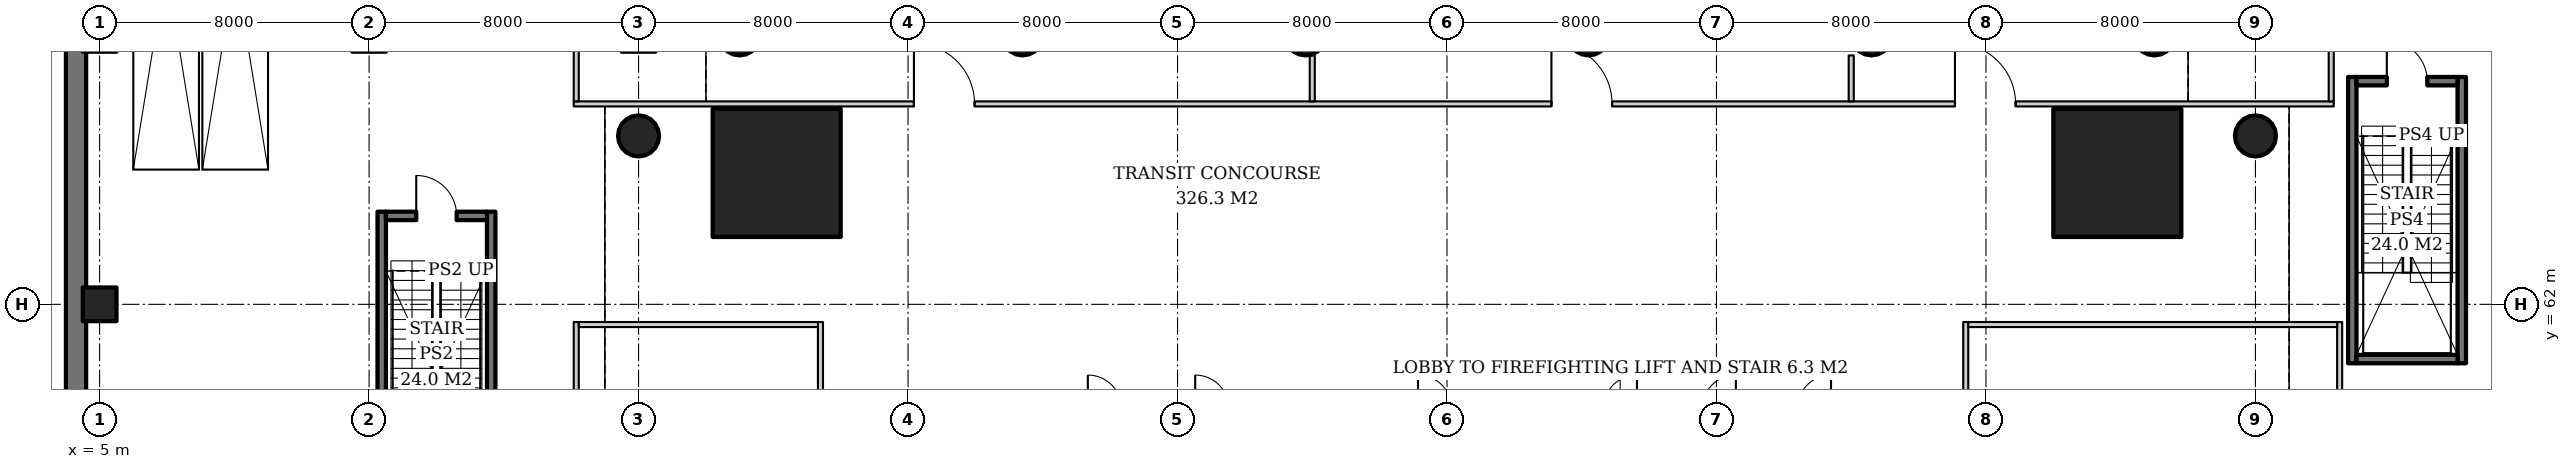
"""IFC4 building model, lengths in metres.
Left out: names, types, materials, properties, quantities, classifications, styles, units other than length and angle.
Written with IfcOpenShell. Run it as: python <this file> out.ifc"""

import sys

from ifc_helpers import new_model, si_unit, direction, frame, frame_2d, origin, origin_2d, place, context, subcontext, project, spatial, rectangle, hollow_circle, extrude, element, fill, save


model = new_model("IFC4")
c1 = context("Model", 3, precision=1e-05, world=origin(), true_north=direction((0.0, 1.0)))
c2 = subcontext(c1, "Body", "Model", "MODEL_VIEW")
j1 = project(units=[si_unit("LENGTHUNIT", "METRE"), si_unit("PLANEANGLEUNIT", "RADIAN")], contexts=[c1])
p1 = place(None, origin())
s1 = spatial("IfcSite", under=j1, at=p1, CompositionType="ELEMENT")
p2 = place(p1, origin())
s2 = spatial("IfcBuilding", under=s1, at=p2, CompositionType="ELEMENT")
p3 = place(p2, frame((0.0, 0.0, -5.0)))
s3 = spatial("IfcBuildingStorey", under=s2, at=p3, CompositionType="ELEMENT", Elevation=-5.0)
p4 = place(p3, frame((5.0, 62.0, 0.0), z_axis=(0.0, 0.0, 1.0), x_axis=(1.0, 0.0, 0.0)))
e1 = element("IfcColumn", 1, at=p4, inside=s3, PredefinedType="COLUMN", context=c2, shape_type="SweptSolid", body=[
    extrude(rectangle(XDim=1.0, YDim=1.0, at=origin_2d()), origin(), (0.0, 0.0, 1.0), 5.0),
])
p5 = place(p3, frame((4.3, 5.6, 0.0), z_axis=(0.0, 0.0, 1.0), x_axis=(0.0, 1.0, 0.0)))
e2 = element("IfcWall", 2, at=p5, inside=s3, PredefinedType="USERDEFINED", context=c2, shape_type="SweptSolid", body=[
    extrude(rectangle(XDim=88.8, YDim=0.6, at=frame_2d((44.4, 0.0))), origin(), (0.0, 0.0, 1.0), 5.0),
])
p6 = place(p3, frame((64.9, 65.9, 0.0), z_axis=(0.0, 0.0, 1.0), x_axis=(1.0, 0.0, 0.0)))
e3 = element("IfcColumn", 3, at=p6, inside=s3, PredefinedType="COLUMN", context=c2, shape_type="SweptSolid", body=[
    extrude(rectangle(XDim=3.8, YDim=3.8, at=origin_2d()), origin(), (0.0, 0.0, 1.0), 5.0),
])
p7 = place(p3, frame((69.0, 67.0, 0.0), z_axis=(0.0, 0.0, 1.0), x_axis=(1.0, 0.0, 0.0)))
e4 = element("IfcColumn", 4, at=p7, inside=s3, PredefinedType="COLUMN", context=c2, shape_type="SweptSolid", body=[
    extrude(hollow_circle(Radius=0.61, WallThickness=0.04, at=origin_2d()), origin(), (0.0, 0.0, 1.0), 5.0),
])
p8 = place(p3, frame((25.1, 65.9, 0.0), z_axis=(0.0, 0.0, 1.0), x_axis=(1.0, 0.0, 0.0)))
e5 = element("IfcColumn", 5, at=p8, inside=s3, PredefinedType="COLUMN", context=c2, shape_type="SweptSolid", body=[
    extrude(rectangle(XDim=3.8, YDim=3.8, at=origin_2d()), origin(), (0.0, 0.0, 1.0), 5.0),
])
for number, where, z_axis, x_axis in (
    (6, (66.0, 70.0, 0.0), (0.0, 0.0, 1.0), (1.0, 0.0, 0.0)),
    (7, (24.0, 70.0, 0.0), (0.0, 0.0, 1.0), (1.0, 0.0, 0.0)),
    (8, (57.6, 70.0, 0.0), (0.0, 0.0, 1.0), (1.0, 0.0, 0.0)),
    (9, (49.2, 70.0, 0.0), (0.0, 0.0, 1.0), (1.0, 0.0, 0.0)),
    (10, (40.8, 70.0, 0.0), (0.0, 0.0, 1.0), (1.0, 0.0, 0.0)),
    (11, (32.4, 70.0, 0.0), (0.0, 0.0, 1.0), (1.0, 0.0, 0.0)),
    (12, (21.0, 67.0, 0.0), (0.0, 0.0, 1.0), (1.0, 0.0, 0.0)),
):
    element("IfcColumn", number, at=place(p3, frame(where, z_axis=z_axis, x_axis=x_axis)), inside=s3, PredefinedType="COLUMN", context=c2, shape_type="SweptSolid", body=[
        extrude(hollow_circle(Radius=0.61, WallThickness=0.04, at=origin_2d()), origin(), (0.0, 0.0, 1.0), 5.0),
    ])
for number, where, z_axis, x_axis in (
    (13, (13.375, 56.25, 0.0), (0.0, 0.0, 1.0), (0.0, 1.0, 0.0)),
    (14, (16.625, 56.25, 0.0), (0.0, 0.0, 1.0), (0.0, 1.0, 0.0)),
):
    element("IfcWall", number, at=place(p3, frame(where, z_axis=z_axis, x_axis=x_axis)), inside=s3, PredefinedType="SOLIDWALL", context=c2, shape_type="SweptSolid", body=[
        extrude(rectangle(XDim=8.5, YDim=0.25, at=frame_2d((4.25, 0.0))), origin(), (0.0, 0.0, 1.0), 4.6),
    ])
p9 = place(p3, frame((13.5, 64.625, 0.0), z_axis=(0.0, 0.0, 1.0), x_axis=(1.0, 0.0, 0.0)))
e15 = element("IfcWall", 15, at=p9, inside=s3, PredefinedType="SOLIDWALL", context=c2, shape_type="SweptSolid", body=[
    extrude(rectangle(XDim=3.0, YDim=0.25, at=frame_2d((1.5, 0.0))), origin(), (0.0, 0.0, 1.0), 4.6),
])
p10 = place(p9, frame((0.9, 0.0, 0.0)))
e16 = element("IfcOpeningElement", 16, at=p10, cuts=e15, PredefinedType="OPENING", context=c2, shape_type="SweptSolid", body=[
    extrude(rectangle(XDim=1.2, YDim=2.1, at=frame_2d((0.6, 1.05))), frame((0.0, 0.135, 0.0), z_axis=(0.0, -1.0, 0.0), x_axis=(1.0, 0.0, 0.0)), (0.0, 0.0, 1.0), 0.27),
])
for number, where, z_axis, x_axis in (
    (17, (71.875, 60.25, 0.0), (0.0, 0.0, 1.0), (0.0, 1.0, 0.0)),
    (18, (75.125, 60.25, 0.0), (0.0, 0.0, 1.0), (0.0, 1.0, 0.0)),
):
    element("IfcWall", number, at=place(p3, frame(where, z_axis=z_axis, x_axis=x_axis)), inside=s3, PredefinedType="SOLIDWALL", context=c2, shape_type="SweptSolid", body=[
        extrude(rectangle(XDim=8.5, YDim=0.25, at=frame_2d((4.25, 0.0))), origin(), (0.0, 0.0, 1.0), 4.6),
    ])
p11 = place(p3, frame((72.0, 60.375, 0.0), z_axis=(0.0, 0.0, 1.0), x_axis=(1.0, 0.0, 0.0)))
e19 = element("IfcWall", 19, at=p11, inside=s3, PredefinedType="SOLIDWALL", context=c2, shape_type="SweptSolid", body=[
    extrude(rectangle(XDim=3.0, YDim=0.25, at=frame_2d((1.5, 0.0))), origin(), (0.0, 0.0, 1.0), 4.6),
])
p12 = place(p3, frame((72.0, 68.625, 0.0), z_axis=(0.0, 0.0, 1.0), x_axis=(1.0, 0.0, 0.0)))
e20 = element("IfcWall", 20, at=p12, inside=s3, PredefinedType="SOLIDWALL", context=c2, shape_type="SweptSolid", body=[
    extrude(rectangle(XDim=3.0, YDim=0.25, at=frame_2d((1.5, 0.0))), origin(), (0.0, 0.0, 1.0), 4.6),
])
p13 = place(p12, frame((0.9, 0.0, 0.0)))
e21 = element("IfcOpeningElement", 21, at=p13, cuts=e20, PredefinedType="OPENING", context=c2, shape_type="SweptSolid", body=[
    extrude(rectangle(XDim=1.2, YDim=2.1, at=frame_2d((0.6, 1.05))), frame((0.0, 0.135, 0.0), z_axis=(0.0, -1.0, 0.0), x_axis=(1.0, 0.0, 0.0)), (0.0, 0.0, 1.0), 0.27),
])
p14 = place(p3, frame((19.15, 30.6, 0.0), z_axis=(0.0, 0.0, 1.0), x_axis=(0.0, 1.0, 0.0)))
e22 = element("IfcWall", 22, at=p14, inside=s3, PredefinedType="PARTITIONING", context=c2, shape_type="SweptSolid", body=[
    extrude(rectangle(XDim=30.875, YDim=0.15, at=frame_2d((15.438, 0.0))), origin(), (0.0, 0.0, 1.0), 4.6),
])
p15 = place(p3, frame((26.4, 30.6, 0.0), z_axis=(0.0, 0.0, 1.0), x_axis=(0.0, 1.0, 0.0)))
e23 = element("IfcWall", 23, at=p15, inside=s3, PredefinedType="PARTITIONING", context=c2, shape_type="SweptSolid", body=[
    extrude(rectangle(XDim=30.875, YDim=0.15, at=frame_2d((15.438, 0.0))), origin(), (0.0, 0.0, 1.0), 3.688),
])
p16 = place(p15, frame((6.8, 0.0, 0.0)))
e24 = element("IfcOpeningElement", 24, at=p16, cuts=e23, PredefinedType="OPENING", context=c2, shape_type="SweptSolid", body=[
    extrude(rectangle(XDim=1.8, YDim=2.4, at=frame_2d((0.9, 1.2))), frame((0.0, 0.085, 0.0), z_axis=(0.0, -1.0, 0.0), x_axis=(1.0, 0.0, 0.0)), (0.0, 0.0, 1.0), 0.17),
])
p17 = place(p15, frame((22.2, 0.0, 0.0)))
e25 = element("IfcOpeningElement", 25, at=p17, cuts=e23, PredefinedType="OPENING", context=c2, shape_type="SweptSolid", body=[
    extrude(rectangle(XDim=1.8, YDim=2.4, at=frame_2d((0.9, 1.2))), frame((0.0, 0.085, 0.0), z_axis=(0.0, -1.0, 0.0), x_axis=(1.0, 0.0, 0.0)), (0.0, 0.0, 1.0), 0.17),
])
p18 = place(p3, frame((19.225, 61.4, 0.0), z_axis=(0.0, 0.0, 1.0), x_axis=(1.0, 0.0, 0.0)))
e26 = element("IfcWall", 26, at=p18, inside=s3, PredefinedType="PARTITIONING", context=c2, shape_type="SweptSolid", body=[
    extrude(rectangle(XDim=7.1, YDim=0.15, at=frame_2d((3.55, 0.0))), origin(), (0.0, 0.0, 1.0), 4.1),
])
p19 = place(p3, frame((60.4, 30.6, 0.0), z_axis=(0.0, 0.0, 1.0), x_axis=(0.0, 1.0, 0.0)))
e27 = element("IfcWall", 27, at=p19, inside=s3, PredefinedType="PARTITIONING", context=c2, shape_type="SweptSolid", body=[
    extrude(rectangle(XDim=30.875, YDim=0.15, at=frame_2d((15.438, 0.0))), origin(), (0.0, 0.0, 1.0), 3.688),
])
p20 = place(p19, frame((6.8, 0.0, 0.0)))
e28 = element("IfcOpeningElement", 28, at=p20, cuts=e27, PredefinedType="OPENING", context=c2, shape_type="SweptSolid", body=[
    extrude(rectangle(XDim=1.8, YDim=2.4, at=frame_2d((0.9, 1.2))), frame((0.0, 0.085, 0.0), z_axis=(0.0, -1.0, 0.0), x_axis=(1.0, 0.0, 0.0)), (0.0, 0.0, 1.0), 0.17),
])
p21 = place(p19, frame((22.2, 0.0, 0.0)))
e29 = element("IfcOpeningElement", 29, at=p21, cuts=e27, PredefinedType="OPENING", context=c2, shape_type="SweptSolid", body=[
    extrude(rectangle(XDim=1.8, YDim=2.4, at=frame_2d((0.9, 1.2))), frame((0.0, 0.085, 0.0), z_axis=(0.0, -1.0, 0.0), x_axis=(1.0, 0.0, 0.0)), (0.0, 0.0, 1.0), 0.17),
])
p22 = place(p3, frame((71.5, 30.6, 0.0), z_axis=(0.0, 0.0, 1.0), x_axis=(0.0, 1.0, 0.0)))
e30 = element("IfcWall", 30, at=p22, inside=s3, PredefinedType="PARTITIONING", context=c2, shape_type="SweptSolid", body=[
    extrude(rectangle(XDim=30.875, YDim=0.15, at=frame_2d((15.438, 0.0))), origin(), (0.0, 0.0, 1.0), 4.6),
])
p23 = place(p3, frame((60.475, 61.4, 0.0), z_axis=(0.0, 0.0, 1.0), x_axis=(1.0, 0.0, 0.0)))
e31 = element("IfcWall", 31, at=p23, inside=s3, PredefinedType="PARTITIONING", context=c2, shape_type="SweptSolid", body=[
    extrude(rectangle(XDim=10.95, YDim=0.15, at=frame_2d((5.475, 0.0))), origin(), (0.0, 0.0, 1.0), 4.1),
])
p24 = place(p3, frame((19.075, 67.95, 0.0), z_axis=(0.0, 0.0, 1.0), x_axis=(1.0, 0.0, 0.0)))
e32 = element("IfcWall", 32, at=p24, inside=s3, PredefinedType="PARTITIONING", context=c2, shape_type="SweptSolid", body=[
    extrude(rectangle(XDim=52.25, YDim=0.15, at=frame_2d((26.125, 0.0))), origin(), (0.0, 0.0, 1.0), 3.688),
])
p25 = place(p24, frame((10.1, 0.0, 0.0)))
e33 = element("IfcOpeningElement", 33, at=p25, cuts=e32, PredefinedType="OPENING", context=c2, shape_type="SweptSolid", body=[
    extrude(rectangle(XDim=1.8, YDim=2.4, at=frame_2d((0.9, 1.2))), frame((0.0, 0.085, 0.0), z_axis=(0.0, -1.0, 0.0), x_axis=(1.0, 0.0, 0.0)), (0.0, 0.0, 1.0), 0.17),
])
p26 = place(p24, frame((29.025, 0.0, 0.0)))
e34 = element("IfcOpeningElement", 34, at=p26, cuts=e32, PredefinedType="OPENING", context=c2, shape_type="SweptSolid", body=[
    extrude(rectangle(XDim=1.8, YDim=2.4, at=frame_2d((0.9, 1.2))), frame((0.0, 0.085, 0.0), z_axis=(0.0, -1.0, 0.0), x_axis=(1.0, 0.0, 0.0)), (0.0, 0.0, 1.0), 0.17),
])
p27 = place(p24, frame((41.005, 0.0, 0.0)))
e35 = element("IfcOpeningElement", 35, at=p27, cuts=e32, PredefinedType="OPENING", context=c2, shape_type="SweptSolid", body=[
    extrude(rectangle(XDim=1.8, YDim=2.4, at=frame_2d((0.9, 1.2))), frame((0.0, 0.085, 0.0), z_axis=(0.0, -1.0, 0.0), x_axis=(1.0, 0.0, 0.0)), (0.0, 0.0, 1.0), 0.17),
])
for number, where, z_axis, x_axis in (
    (36, (19.15, 68.025, 0.0), (0.0, 0.0, 1.0), (0.0, 1.0, 0.0)),
    (37, (71.25, 68.025, 0.0), (0.0, 0.0, 1.0), (0.0, 1.0, 0.0)),
):
    element("IfcWall", number, at=place(p3, frame(where, z_axis=z_axis, x_axis=x_axis)), inside=s3, PredefinedType="PARTITIONING", context=c2, shape_type="SweptSolid", body=[
        extrude(rectangle(XDim=11.5, YDim=0.15, at=frame_2d((5.75, 0.0))), origin(), (0.0, 0.0, 1.0), 4.6),
    ])
for number, where, z_axis, x_axis in (
    (38, (41.0, 68.025, 0.0), (0.0, 0.0, 1.0), (0.0, 1.0, 0.0)),
    (39, (57.0, 68.025, 0.0), (0.0, 0.0, 1.0), (0.0, 1.0, 0.0)),
):
    element("IfcWall", number, at=place(p3, frame(where, z_axis=z_axis, x_axis=x_axis)), inside=s3, PredefinedType="PARTITIONING", context=c2, shape_type="SweptSolid", body=[
        extrude(rectangle(XDim=1.365, YDim=0.15, at=frame_2d((0.683, 0.0))), origin(), (0.0, 0.0, 1.0), 4.7),
    ])
p28 = place(p10, origin())
e40 = element("IfcDoor", 40, at=p28, inside=s3, OperationType="SINGLE_SWING_LEFT", PredefinedType="DOOR", context=c2, shape_type="SweptSolid", body=[
    extrude(rectangle(XDim=1.2, YDim=2.1, at=frame_2d((0.6, 1.05))), frame((0.0, 0.025, 0.0), z_axis=(0.0, -1.0, 0.0), x_axis=(1.0, 0.0, 0.0)), (0.0, 0.0, 1.0), 0.05),
])
fill(e16, e40)
p29 = place(p13, origin())
e41 = element("IfcDoor", 41, at=p29, inside=s3, OperationType="SINGLE_SWING_LEFT", PredefinedType="DOOR", context=c2, shape_type="SweptSolid", body=[
    extrude(rectangle(XDim=1.2, YDim=2.1, at=frame_2d((0.6, 1.05))), frame((0.0, 0.025, 0.0), z_axis=(0.0, -1.0, 0.0), x_axis=(1.0, 0.0, 0.0)), (0.0, 0.0, 1.0), 0.05),
])
fill(e21, e41)
p30 = place(p25, origin())
e42 = element("IfcDoor", 42, at=p30, inside=s3, OperationType="DOUBLE_DOOR_SINGLE_SWING", PredefinedType="DOOR", context=c2, shape_type="SweptSolid", body=[
    extrude(rectangle(XDim=1.8, YDim=2.4, at=frame_2d((0.9, 1.2))), frame((0.0, 0.025, 0.0), z_axis=(0.0, -1.0, 0.0), x_axis=(1.0, 0.0, 0.0)), (0.0, 0.0, 1.0), 0.05),
])
fill(e33, e42)
p31 = place(p26, origin())
e43 = element("IfcDoor", 43, at=p31, inside=s3, OperationType="DOUBLE_DOOR_SINGLE_SWING", PredefinedType="DOOR", context=c2, shape_type="SweptSolid", body=[
    extrude(rectangle(XDim=1.8, YDim=2.4, at=frame_2d((0.9, 1.2))), frame((0.0, 0.025, 0.0), z_axis=(0.0, -1.0, 0.0), x_axis=(1.0, 0.0, 0.0)), (0.0, 0.0, 1.0), 0.05),
])
fill(e34, e43)
p32 = place(p27, origin())
e44 = element("IfcDoor", 44, at=p32, inside=s3, OperationType="DOUBLE_DOOR_SINGLE_SWING", PredefinedType="DOOR", context=c2, shape_type="SweptSolid", body=[
    extrude(rectangle(XDim=1.8, YDim=2.4, at=frame_2d((0.9, 1.2))), frame((0.0, 0.025, 0.0), z_axis=(0.0, -1.0, 0.0), x_axis=(1.0, 0.0, 0.0)), (0.0, 0.0, 1.0), 0.05),
])
fill(e35, e44)
save(model, sys.argv[1])
